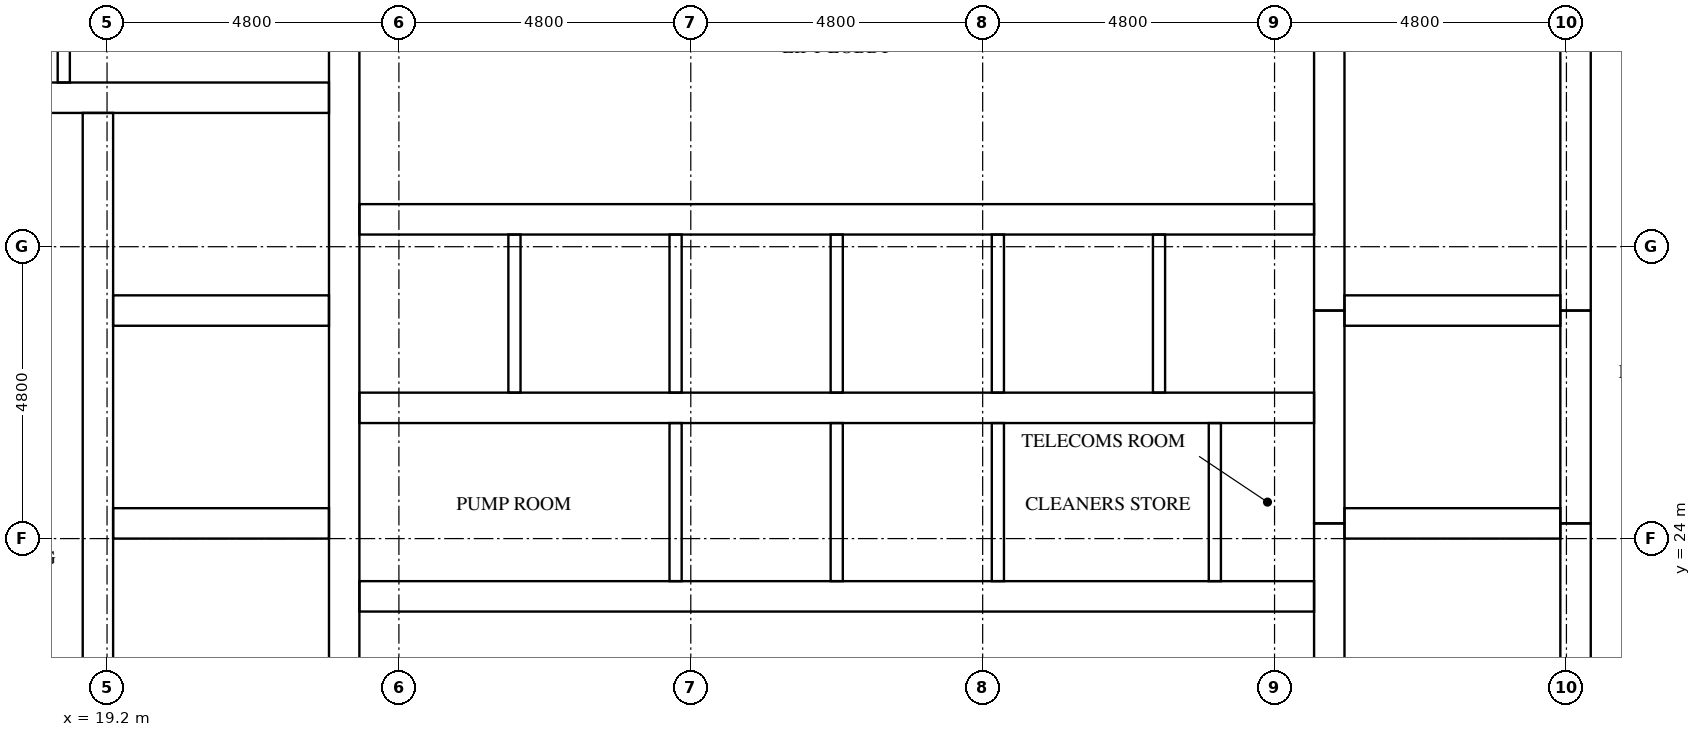
"""IFC4 building model, lengths in metres.
Left out: names, types, materials, properties, quantities, classifications, styles, units other than length and angle.
Written with IfcOpenShell. Run it as: python <this file> out.ifc"""

import sys

from ifc_helpers import new_model, si_unit, direction, frame, frame_2d, origin, place, context, subcontext, project, spatial, rectangle, extrude, element, fill, save


model = new_model("IFC4")
c1 = context("Model", 3, precision=1e-05, world=origin(), true_north=direction((0.0, 1.0)))
c2 = subcontext(c1, "Body", "Model", "MODEL_VIEW")
j1 = project(units=[si_unit("LENGTHUNIT", "METRE"), si_unit("PLANEANGLEUNIT", "RADIAN")], contexts=[c1])
p1 = place(None, origin())
s1 = spatial("IfcSite", under=j1, at=p1, CompositionType="ELEMENT")
p2 = place(p1, origin())
s2 = spatial("IfcBuilding", under=s1, at=p2, CompositionType="ELEMENT")
p3 = place(p2, frame((0.0, 0.0, 192.9)))
s3 = spatial("IfcBuildingStorey", under=s2, at=p3, CompositionType="ELEMENT", Elevation=192.9)
p4 = place(p3, frame((19.05, 15.7, 0.0), z_axis=(0.0, 0.0, 1.0), x_axis=(0.0, 1.0, 0.0)))
e1 = element("IfcWall", 1, at=p4, inside=s3, PredefinedType="SHEAR", context=c2, shape_type="SweptSolid", body=[
    extrude(rectangle(XDim=15.3, YDim=0.5, at=frame_2d((7.65, 0.0))), origin(), (0.0, 0.0, 1.0), 3.2),
])
p5 = place(p4, frame((9.75, 0.0, 0.0)))
e2 = element("IfcOpeningElement", 2, at=p5, cuts=e1, PredefinedType="OPENING", context=c2, shape_type="SweptSolid", body=[
    extrude(rectangle(XDim=1.1, YDim=2.1, at=frame_2d((0.55, 1.05))), frame((0.0, 0.26, 0.0), z_axis=(0.0, -1.0, 0.0), x_axis=(1.0, 0.0, 0.0)), (0.0, 0.0, 1.0), 0.52),
])
p6 = place(p4, frame((13.25, 0.0, 0.0)))
e3 = element("IfcOpeningElement", 3, at=p6, cuts=e1, PredefinedType="OPENING", context=c2, shape_type="SweptSolid", body=[
    extrude(rectangle(XDim=1.1, YDim=2.1, at=frame_2d((0.55, 1.05))), frame((0.0, 0.26, 0.0), z_axis=(0.0, -1.0, 0.0), x_axis=(1.0, 0.0, 0.0)), (0.0, 0.0, 1.0), 0.52),
])
p7 = place(p4, frame((0.5, 0.0, 0.0)))
e4 = element("IfcOpeningElement", 4, at=p7, cuts=e1, PredefinedType="OPENING", context=c2, shape_type="SweptSolid", body=[
    extrude(rectangle(XDim=1.2, YDim=2.1, at=frame_2d((0.6, 1.05))), frame((0.0, 0.26, 0.0), z_axis=(0.0, -1.0, 0.0), x_axis=(1.0, 0.0, 0.0)), (0.0, 0.0, 1.0), 0.52),
])
p8 = place(p3, frame((23.1, 15.7, 0.0), z_axis=(0.0, 0.0, 1.0), x_axis=(0.0, 1.0, 0.0)))
e5 = element("IfcWall", 5, at=p8, inside=s3, PredefinedType="SHEAR", context=c2, shape_type="SweptSolid", body=[
    extrude(rectangle(XDim=21.4, YDim=0.5, at=frame_2d((10.7, 0.0))), origin(), (0.0, 0.0, 1.0), 3.2),
])
p9 = place(p3, frame((39.3, 15.7, 0.0), z_axis=(0.0, 0.0, 1.0), x_axis=(0.0, 1.0, 0.0)))
e6 = element("IfcWall", 6, at=p9, inside=s3, PredefinedType="SHEAR", context=c2, shape_type="SweptSolid", body=[
    extrude(rectangle(XDim=8.55, YDim=0.5, at=frame_2d((4.275, 0.0))), origin(), (0.0, 0.0, 1.0), 3.2),
])
p10 = place(p3, frame((39.3, 24.25, 0.0), z_axis=(0.0, 0.0, 1.0), x_axis=(0.0, 1.0, 0.0)))
e7 = element("IfcWall", 7, at=p10, inside=s3, PredefinedType="SHEAR", context=c2, shape_type="SweptSolid", body=[
    extrude(rectangle(XDim=3.5, YDim=0.5, at=frame_2d((1.75, 0.0))), origin(), (0.0, 0.0, 1.0), 3.2),
])
p11 = place(p3, frame((39.3, 27.75, 0.0), z_axis=(0.0, 0.0, 1.0), x_axis=(0.0, 1.0, 0.0)))
e8 = element("IfcWall", 8, at=p11, inside=s3, PredefinedType="SHEAR", context=c2, shape_type="SweptSolid", body=[
    extrude(rectangle(XDim=9.35, YDim=0.5, at=frame_2d((4.675, 0.0))), origin(), (0.0, 0.0, 1.0), 3.2),
])
p12 = place(p3, frame((43.35, 15.7, 0.0), z_axis=(0.0, 0.0, 1.0), x_axis=(0.0, 1.0, 0.0)))
e9 = element("IfcWall", 9, at=p12, inside=s3, PredefinedType="SHEAR", context=c2, shape_type="SweptSolid", body=[
    extrude(rectangle(XDim=8.55, YDim=0.5, at=frame_2d((4.275, 0.0))), origin(), (0.0, 0.0, 1.0), 3.2),
])
p13 = place(p12, frame((0.5, 0.0, 0.0)))
e10 = element("IfcOpeningElement", 10, at=p13, cuts=e9, PredefinedType="OPENING", context=c2, shape_type="SweptSolid", body=[
    extrude(rectangle(XDim=1.2, YDim=2.1, at=frame_2d((0.6, 1.05))), frame((0.0, 0.26, 0.0), z_axis=(0.0, -1.0, 0.0), x_axis=(1.0, 0.0, 0.0)), (0.0, 0.0, 1.0), 0.52),
])
p14 = place(p3, frame((43.35, 24.25, 0.0), z_axis=(0.0, 0.0, 1.0), x_axis=(0.0, 1.0, 0.0)))
e11 = element("IfcWall", 11, at=p14, inside=s3, PredefinedType="SHEAR", context=c2, shape_type="SweptSolid", body=[
    extrude(rectangle(XDim=3.5, YDim=0.5, at=frame_2d((1.75, 0.0))), origin(), (0.0, 0.0, 1.0), 3.2),
])
p15 = place(p14, frame((1.2, 0.0, 0.0)))
e12 = element("IfcOpeningElement", 12, at=p15, cuts=e11, PredefinedType="OPENING", context=c2, shape_type="SweptSolid", body=[
    extrude(rectangle(XDim=1.1, YDim=2.1, at=frame_2d((0.55, 1.05))), frame((0.0, 0.26, 0.0), z_axis=(0.0, -1.0, 0.0), x_axis=(1.0, 0.0, 0.0)), (0.0, 0.0, 1.0), 0.52),
])
p16 = place(p3, frame((43.35, 27.75, 0.0), z_axis=(0.0, 0.0, 1.0), x_axis=(0.0, 1.0, 0.0)))
e13 = element("IfcWall", 13, at=p16, inside=s3, PredefinedType="SHEAR", context=c2, shape_type="SweptSolid", body=[
    extrude(rectangle(XDim=9.35, YDim=0.5, at=frame_2d((4.675, 0.0))), origin(), (0.0, 0.0, 1.0), 3.2),
])
p17 = place(p16, frame((7.65, 0.0, 0.0)))
e14 = element("IfcOpeningElement", 14, at=p17, cuts=e13, PredefinedType="OPENING", context=c2, shape_type="SweptSolid", body=[
    extrude(rectangle(XDim=1.2, YDim=2.1, at=frame_2d((0.6, 1.05))), frame((0.0, 0.26, 0.0), z_axis=(0.0, -1.0, 0.0), x_axis=(1.0, 0.0, 0.0)), (0.0, 0.0, 1.0), 0.52),
])
for number, where, z_axis, x_axis in (
    (15, (19.3, 24.25, 0.0), (0.0, 0.0, 1.0), (1.0, 0.0, 0.0)),
    (16, (19.3, 27.75, 0.0), (0.0, 0.0, 1.0), (1.0, 0.0, 0.0)),
):
    element("IfcWall", number, at=place(p3, frame(where, z_axis=z_axis, x_axis=x_axis)), inside=s3, PredefinedType="SHEAR", context=c2, shape_type="SweptSolid", body=[
        extrude(rectangle(XDim=3.55, YDim=0.5, at=frame_2d((1.775, 0.0))), origin(), (0.0, 0.0, 1.0), 3.2),
    ])
p18 = place(p3, frame((15.7, 31.25, 0.0), z_axis=(0.0, 0.0, 1.0), x_axis=(1.0, 0.0, 0.0)))
e17 = element("IfcWall", 17, at=p18, inside=s3, PredefinedType="SHEAR", context=c2, shape_type="SweptSolid", body=[
    extrude(rectangle(XDim=7.15, YDim=0.5, at=frame_2d((3.575, 0.0))), origin(), (0.0, 0.0, 1.0), 3.2),
])
for number, where, z_axis, x_axis in (
    (18, (39.55, 24.25, 0.0), (0.0, 0.0, 1.0), (1.0, 0.0, 0.0)),
    (19, (39.55, 27.75, 0.0), (0.0, 0.0, 1.0), (1.0, 0.0, 0.0)),
):
    element("IfcWall", number, at=place(p3, frame(where, z_axis=z_axis, x_axis=x_axis)), inside=s3, PredefinedType="SHEAR", context=c2, shape_type="SweptSolid", body=[
        extrude(rectangle(XDim=3.55, YDim=0.5, at=frame_2d((1.775, 0.0))), origin(), (0.0, 0.0, 1.0), 3.2),
    ])
p19 = place(p3, frame((23.35, 23.05, 0.0), z_axis=(0.0, 0.0, 1.0), x_axis=(1.0, 0.0, 0.0)))
e20 = element("IfcWall", 20, at=p19, inside=s3, PredefinedType="SHEAR", context=c2, shape_type="SweptSolid", body=[
    extrude(rectangle(XDim=15.7, YDim=0.5, at=frame_2d((7.85, 0.0))), origin(), (0.0, 0.0, 1.0), 3.2),
])
p20 = place(p19, frame((2.05, 0.0, 0.0)))
e21 = element("IfcOpeningElement", 21, at=p20, cuts=e20, PredefinedType="OPENING", context=c2, shape_type="SweptSolid", body=[
    extrude(rectangle(XDim=1.0, YDim=2.1, at=frame_2d((0.5, 1.05))), frame((0.0, 0.26, 0.0), z_axis=(0.0, -1.0, 0.0), x_axis=(1.0, 0.0, 0.0)), (0.0, 0.0, 1.0), 0.52),
])
p21 = place(p19, frame((11.784, 0.0, 0.0)))
e22 = element("IfcOpeningElement", 22, at=p21, cuts=e20, PredefinedType="OPENING", context=c2, shape_type="SweptSolid", body=[
    extrude(rectangle(XDim=1.0, YDim=2.1, at=frame_2d((0.5, 1.05))), frame((0.0, 0.26, 0.0), z_axis=(0.0, -1.0, 0.0), x_axis=(1.0, 0.0, 0.0)), (0.0, 0.0, 1.0), 0.52),
])
p22 = place(p19, frame((14.434, 0.0, 0.0)))
e23 = element("IfcOpeningElement", 23, at=p22, cuts=e20, PredefinedType="OPENING", context=c2, shape_type="SweptSolid", body=[
    extrude(rectangle(XDim=1.0, YDim=2.1, at=frame_2d((0.5, 1.05))), frame((0.0, 0.26, 0.0), z_axis=(0.0, -1.0, 0.0), x_axis=(1.0, 0.0, 0.0)), (0.0, 0.0, 1.0), 0.52),
])
p23 = place(p3, frame((23.35, 26.15, 0.0), z_axis=(0.0, 0.0, 1.0), x_axis=(1.0, 0.0, 0.0)))
e24 = element("IfcWall", 24, at=p23, inside=s3, PredefinedType="SHEAR", context=c2, shape_type="SweptSolid", body=[
    extrude(rectangle(XDim=15.7, YDim=0.5, at=frame_2d((7.85, 0.0))), origin(), (0.0, 0.0, 1.0), 3.2),
])
p24 = place(p3, frame((23.35, 29.25, 0.0), z_axis=(0.0, 0.0, 1.0), x_axis=(1.0, 0.0, 0.0)))
e25 = element("IfcWall", 25, at=p24, inside=s3, PredefinedType="SHEAR", context=c2, shape_type="SweptSolid", body=[
    extrude(rectangle(XDim=15.7, YDim=0.5, at=frame_2d((7.85, 0.0))), origin(), (0.0, 0.0, 1.0), 3.2),
])
p25 = place(p24, frame((0.675, 0.0, 0.0)))
e26 = element("IfcOpeningElement", 26, at=p25, cuts=e25, PredefinedType="OPENING", context=c2, shape_type="SweptSolid", body=[
    extrude(rectangle(XDim=1.1, YDim=2.1, at=frame_2d((0.55, 1.05))), frame((0.0, 0.26, 0.0), z_axis=(0.0, -1.0, 0.0), x_axis=(1.0, 0.0, 0.0)), (0.0, 0.0, 1.0), 0.52),
])
p26 = place(p24, frame((3.325, 0.0, 0.0)))
e27 = element("IfcOpeningElement", 27, at=p26, cuts=e25, PredefinedType="OPENING", context=c2, shape_type="SweptSolid", body=[
    extrude(rectangle(XDim=1.1, YDim=2.1, at=frame_2d((0.55, 1.05))), frame((0.0, 0.26, 0.0), z_axis=(0.0, -1.0, 0.0), x_axis=(1.0, 0.0, 0.0)), (0.0, 0.0, 1.0), 0.52),
])
p27 = place(p24, frame((5.975, 0.0, 0.0)))
e28 = element("IfcOpeningElement", 28, at=p27, cuts=e25, PredefinedType="OPENING", context=c2, shape_type="SweptSolid", body=[
    extrude(rectangle(XDim=1.1, YDim=2.1, at=frame_2d((0.55, 1.05))), frame((0.0, 0.26, 0.0), z_axis=(0.0, -1.0, 0.0), x_axis=(1.0, 0.0, 0.0)), (0.0, 0.0, 1.0), 0.52),
])
p28 = place(p24, frame((8.625, 0.0, 0.0)))
e29 = element("IfcOpeningElement", 29, at=p28, cuts=e25, PredefinedType="OPENING", context=c2, shape_type="SweptSolid", body=[
    extrude(rectangle(XDim=1.1, YDim=2.1, at=frame_2d((0.55, 1.05))), frame((0.0, 0.26, 0.0), z_axis=(0.0, -1.0, 0.0), x_axis=(1.0, 0.0, 0.0)), (0.0, 0.0, 1.0), 0.52),
])
p29 = place(p24, frame((11.275, 0.0, 0.0)))
e30 = element("IfcOpeningElement", 30, at=p29, cuts=e25, PredefinedType="OPENING", context=c2, shape_type="SweptSolid", body=[
    extrude(rectangle(XDim=1.1, YDim=2.1, at=frame_2d((0.55, 1.05))), frame((0.0, 0.26, 0.0), z_axis=(0.0, -1.0, 0.0), x_axis=(1.0, 0.0, 0.0)), (0.0, 0.0, 1.0), 0.52),
])
p30 = place(p24, frame((13.925, 0.0, 0.0)))
e31 = element("IfcOpeningElement", 31, at=p30, cuts=e25, PredefinedType="OPENING", context=c2, shape_type="SweptSolid", body=[
    extrude(rectangle(XDim=1.1, YDim=2.1, at=frame_2d((0.55, 1.05))), frame((0.0, 0.26, 0.0), z_axis=(0.0, -1.0, 0.0), x_axis=(1.0, 0.0, 0.0)), (0.0, 0.0, 1.0), 0.52),
])
p31 = place(p3, frame((25.9, 26.4, 0.0), z_axis=(0.0, 0.0, 1.0), x_axis=(0.0, 1.0, 0.0)))
e32 = element("IfcWall", 32, at=p31, inside=s3, PredefinedType="SOLIDWALL", context=c2, shape_type="SweptSolid", body=[
    extrude(rectangle(XDim=2.6, YDim=0.2, at=frame_2d((1.3, 0.0))), origin(), (0.0, 0.0, 1.0), 3.2),
])
p32 = place(p3, frame((28.55, 23.3, 0.0), z_axis=(0.0, 0.0, 1.0), x_axis=(0.0, 1.0, 0.0)))
e33 = element("IfcWall", 33, at=p32, inside=s3, PredefinedType="SOLIDWALL", context=c2, shape_type="SweptSolid", body=[
    extrude(rectangle(XDim=2.6, YDim=0.2, at=frame_2d((1.3, 0.0))), origin(), (0.0, 0.0, 1.0), 3.2),
])
p33 = place(p3, frame((28.55, 26.4, 0.0), z_axis=(0.0, 0.0, 1.0), x_axis=(0.0, 1.0, 0.0)))
e34 = element("IfcWall", 34, at=p33, inside=s3, PredefinedType="SOLIDWALL", context=c2, shape_type="SweptSolid", body=[
    extrude(rectangle(XDim=2.6, YDim=0.2, at=frame_2d((1.3, 0.0))), origin(), (0.0, 0.0, 1.0), 3.2),
])
p34 = place(p3, frame((31.2, 23.3, 0.0), z_axis=(0.0, 0.0, 1.0), x_axis=(0.0, 1.0, 0.0)))
e35 = element("IfcWall", 35, at=p34, inside=s3, PredefinedType="SOLIDWALL", context=c2, shape_type="SweptSolid", body=[
    extrude(rectangle(XDim=2.6, YDim=0.2, at=frame_2d((1.3, 0.0))), origin(), (0.0, 0.0, 1.0), 3.2),
])
p35 = place(p3, frame((31.2, 26.4, 0.0), z_axis=(0.0, 0.0, 1.0), x_axis=(0.0, 1.0, 0.0)))
e36 = element("IfcWall", 36, at=p35, inside=s3, PredefinedType="SOLIDWALL", context=c2, shape_type="SweptSolid", body=[
    extrude(rectangle(XDim=2.6, YDim=0.2, at=frame_2d((1.3, 0.0))), origin(), (0.0, 0.0, 1.0), 3.2),
])
p36 = place(p3, frame((33.85, 23.3, 0.0), z_axis=(0.0, 0.0, 1.0), x_axis=(0.0, 1.0, 0.0)))
e37 = element("IfcWall", 37, at=p36, inside=s3, PredefinedType="SOLIDWALL", context=c2, shape_type="SweptSolid", body=[
    extrude(rectangle(XDim=2.6, YDim=0.2, at=frame_2d((1.3, 0.0))), origin(), (0.0, 0.0, 1.0), 3.2),
])
for number, where, z_axis, x_axis in (
    (38, (33.85, 26.4, 0.0), (0.0, 0.0, 1.0), (0.0, 1.0, 0.0)),
    (39, (36.5, 26.4, 0.0), (0.0, 0.0, 1.0), (0.0, 1.0, 0.0)),
):
    element("IfcWall", number, at=place(p3, frame(where, z_axis=z_axis, x_axis=x_axis)), inside=s3, PredefinedType="SOLIDWALL", context=c2, shape_type="SweptSolid", body=[
        extrude(rectangle(XDim=2.6, YDim=0.2, at=frame_2d((1.3, 0.0))), origin(), (0.0, 0.0, 1.0), 3.2),
    ])
p37 = place(p3, frame((18.489, 31.5, 0.0), z_axis=(0.0, 0.0, 1.0), x_axis=(0.0, 1.0, 0.0)))
e40 = element("IfcWall", 40, at=p37, inside=s3, PredefinedType="PARTITIONING", context=c2, shape_type="SweptSolid", body=[
    extrude(rectangle(XDim=5.6, YDim=0.2, at=frame_2d((2.8, 0.0))), origin(), (0.0, 0.0, 1.0), 3.2),
])
p38 = place(p3, frame((37.418, 23.3, 0.0), z_axis=(0.0, 0.0, 1.0), x_axis=(0.0, 1.0, 0.0)))
e41 = element("IfcWall", 41, at=p38, inside=s3, PredefinedType="PARTITIONING", context=c2, shape_type="SweptSolid", body=[
    extrude(rectangle(XDim=2.6, YDim=0.2, at=frame_2d((1.3, 0.0))), origin(), (0.0, 0.0, 1.0), 3.2),
])
p39 = place(p25, origin())
e42 = element("IfcDoor", 42, at=p39, inside=s3, OperationType="DOUBLE_DOOR_SLIDING", PredefinedType="DOOR", context=c2, shape_type="SweptSolid", body=[
    extrude(rectangle(XDim=1.1, YDim=2.1, at=frame_2d((0.55, 1.05))), frame((0.0, 0.025, 0.0), z_axis=(0.0, -1.0, 0.0), x_axis=(1.0, 0.0, 0.0)), (0.0, 0.0, 1.0), 0.05),
])
fill(e26, e42)
p40 = place(p26, origin())
e43 = element("IfcDoor", 43, at=p40, inside=s3, OperationType="DOUBLE_DOOR_SLIDING", PredefinedType="DOOR", context=c2, shape_type="SweptSolid", body=[
    extrude(rectangle(XDim=1.1, YDim=2.1, at=frame_2d((0.55, 1.05))), frame((0.0, 0.025, 0.0), z_axis=(0.0, -1.0, 0.0), x_axis=(1.0, 0.0, 0.0)), (0.0, 0.0, 1.0), 0.05),
])
fill(e27, e43)
p41 = place(p27, origin())
e44 = element("IfcDoor", 44, at=p41, inside=s3, OperationType="DOUBLE_DOOR_SLIDING", PredefinedType="DOOR", context=c2, shape_type="SweptSolid", body=[
    extrude(rectangle(XDim=1.1, YDim=2.1, at=frame_2d((0.55, 1.05))), frame((0.0, 0.025, 0.0), z_axis=(0.0, -1.0, 0.0), x_axis=(1.0, 0.0, 0.0)), (0.0, 0.0, 1.0), 0.05),
])
fill(e28, e44)
p42 = place(p28, origin())
e45 = element("IfcDoor", 45, at=p42, inside=s3, OperationType="DOUBLE_DOOR_SLIDING", PredefinedType="DOOR", context=c2, shape_type="SweptSolid", body=[
    extrude(rectangle(XDim=1.1, YDim=2.1, at=frame_2d((0.55, 1.05))), frame((0.0, 0.025, 0.0), z_axis=(0.0, -1.0, 0.0), x_axis=(1.0, 0.0, 0.0)), (0.0, 0.0, 1.0), 0.05),
])
fill(e29, e45)
p43 = place(p29, origin())
e46 = element("IfcDoor", 46, at=p43, inside=s3, OperationType="DOUBLE_DOOR_SLIDING", PredefinedType="DOOR", context=c2, shape_type="SweptSolid", body=[
    extrude(rectangle(XDim=1.1, YDim=2.1, at=frame_2d((0.55, 1.05))), frame((0.0, 0.025, 0.0), z_axis=(0.0, -1.0, 0.0), x_axis=(1.0, 0.0, 0.0)), (0.0, 0.0, 1.0), 0.05),
])
fill(e30, e46)
p44 = place(p30, origin())
e47 = element("IfcDoor", 47, at=p44, inside=s3, OperationType="DOUBLE_DOOR_SLIDING", PredefinedType="DOOR", context=c2, shape_type="SweptSolid", body=[
    extrude(rectangle(XDim=1.1, YDim=2.1, at=frame_2d((0.55, 1.05))), frame((0.0, 0.025, 0.0), z_axis=(0.0, -1.0, 0.0), x_axis=(1.0, 0.0, 0.0)), (0.0, 0.0, 1.0), 0.05),
])
fill(e31, e47)
p45 = place(p5, origin())
e48 = element("IfcDoor", 48, at=p45, inside=s3, OperationType="DOUBLE_DOOR_SLIDING", PredefinedType="DOOR", context=c2, shape_type="SweptSolid", body=[
    extrude(rectangle(XDim=1.1, YDim=2.1, at=frame_2d((0.55, 1.05))), frame((0.0, 0.025, 0.0), z_axis=(0.0, -1.0, 0.0), x_axis=(1.0, 0.0, 0.0)), (0.0, 0.0, 1.0), 0.05),
])
fill(e2, e48)
p46 = place(p6, origin())
e49 = element("IfcDoor", 49, at=p46, inside=s3, OperationType="DOUBLE_DOOR_SLIDING", PredefinedType="DOOR", context=c2, shape_type="SweptSolid", body=[
    extrude(rectangle(XDim=1.1, YDim=2.1, at=frame_2d((0.55, 1.05))), frame((0.0, 0.025, 0.0), z_axis=(0.0, -1.0, 0.0), x_axis=(1.0, 0.0, 0.0)), (0.0, 0.0, 1.0), 0.05),
])
fill(e3, e49)
p47 = place(p15, origin())
e50 = element("IfcDoor", 50, at=p47, inside=s3, OperationType="DOUBLE_DOOR_SLIDING", PredefinedType="DOOR", context=c2, shape_type="SweptSolid", body=[
    extrude(rectangle(XDim=1.1, YDim=2.1, at=frame_2d((0.55, 1.05))), frame((0.0, 0.025, 0.0), z_axis=(0.0, -1.0, 0.0), x_axis=(1.0, 0.0, 0.0)), (0.0, 0.0, 1.0), 0.05),
])
fill(e12, e50)
p48 = place(p20, frame((1.0, 0.0, 0.0), z_axis=(0.0, 0.0, 1.0), x_axis=(-1.0, 0.0, 0.0)))
e51 = element("IfcDoor", 51, at=p48, inside=s3, OperationType="SINGLE_SWING_LEFT", PredefinedType="DOOR", context=c2, shape_type="SweptSolid", body=[
    extrude(rectangle(XDim=1.0, YDim=2.1, at=frame_2d((0.5, 1.05))), frame((0.0, 0.025, 0.0), z_axis=(0.0, -1.0, 0.0), x_axis=(1.0, 0.0, 0.0)), (0.0, 0.0, 1.0), 0.05),
])
fill(e21, e51)
p49 = place(p21, frame((1.0, 0.0, 0.0), z_axis=(0.0, 0.0, 1.0), x_axis=(-1.0, 0.0, 0.0)))
e52 = element("IfcDoor", 52, at=p49, inside=s3, OperationType="SINGLE_SWING_RIGHT", PredefinedType="DOOR", context=c2, shape_type="SweptSolid", body=[
    extrude(rectangle(XDim=1.0, YDim=2.1, at=frame_2d((0.5, 1.05))), frame((0.0, 0.025, 0.0), z_axis=(0.0, -1.0, 0.0), x_axis=(1.0, 0.0, 0.0)), (0.0, 0.0, 1.0), 0.05),
])
fill(e22, e52)
p50 = place(p22, frame((1.0, 0.0, 0.0), z_axis=(0.0, 0.0, 1.0), x_axis=(-1.0, 0.0, 0.0)))
e53 = element("IfcDoor", 53, at=p50, inside=s3, OperationType="SINGLE_SWING_LEFT", PredefinedType="DOOR", context=c2, shape_type="SweptSolid", body=[
    extrude(rectangle(XDim=1.0, YDim=2.1, at=frame_2d((0.5, 1.05))), frame((0.0, 0.025, 0.0), z_axis=(0.0, -1.0, 0.0), x_axis=(1.0, 0.0, 0.0)), (0.0, 0.0, 1.0), 0.05),
])
fill(e23, e53)
save(model, sys.argv[1])
